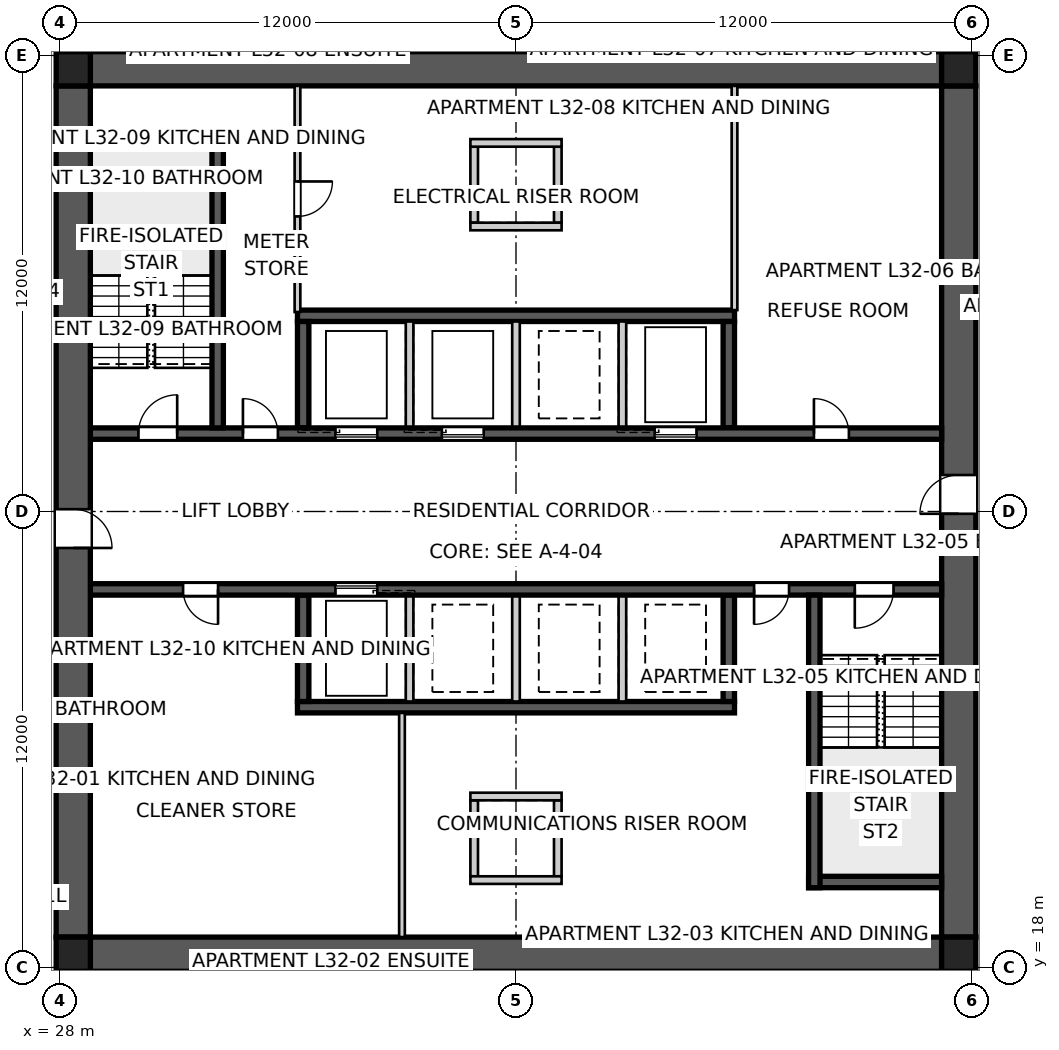
"""IFC4 building model, lengths in metres.
Left out: names, types, materials, properties, quantities, classifications, styles, units other than length and angle.
Written with IfcOpenShell. Run it as: python <this file> out.ifc"""

import sys

from ifc_helpers import new_model, si_unit, direction, frame, frame_2d, origin, origin_2d, place, context, subcontext, project, spatial, polyline, rectangle, outline, extrude, element, fill, save


model = new_model("IFC4")
c1 = context("Model", 3, precision=1e-05, world=origin(), true_north=direction((0.0, 1.0)))
c2 = subcontext(c1, "Body", "Model", "MODEL_VIEW")
j1 = project(units=[si_unit("LENGTHUNIT", "METRE"), si_unit("PLANEANGLEUNIT", "RADIAN")], contexts=[c1])
p1 = place(None, origin())
s1 = spatial("IfcSite", under=j1, at=p1, CompositionType="ELEMENT")
p2 = place(p1, origin())
s2 = spatial("IfcBuilding", under=s1, at=p2, CompositionType="ELEMENT")
p3 = place(p2, frame((0.0, 0.0, 118.4)))
s3 = spatial("IfcBuildingStorey", under=s2, at=p3, CompositionType="ELEMENT", Elevation=118.4)
for number, where, z_axis, x_axis in (
    (1, (28.8, 41.65, 0.0), (0.0, 0.0, 1.0), (1.0, 0.0, 0.0)),
    (2, (51.2, 18.35, 0.0), (0.0, 0.0, 1.0), (-1.0, 0.0, 0.0)),
):
    element("IfcWall", number, at=place(p3, frame(where, z_axis=z_axis, x_axis=x_axis)), inside=s3, PredefinedType="SHEAR", context=c2, shape_type="SweptSolid", body=[
        extrude(outline(polyline([(0.0, -0.45), (22.4, -0.45), (22.4, -0.025), (22.85, -0.025), (22.85, 0.025), (22.4, 0.025), (22.4, 0.45), (0.0, 0.45), (0.0, 0.025), (-0.45, 0.025), (-0.45, -0.025), (0.0, -0.025), (0.0, -0.45)])), origin(), (0.0, 0.0, 1.0), 3.4),
    ])
p4 = place(p3, frame((51.65, 18.8, 0.0), z_axis=(0.0, 0.0, 1.0), x_axis=(0.0, 1.0, 0.0)))
e3 = element("IfcWall", 3, at=p4, inside=s3, PredefinedType="SHEAR", context=c2, shape_type="SweptSolid", body=[
    extrude(outline(polyline([(0.0, -0.45), (22.4, -0.45), (22.4, -0.025), (22.85, -0.025), (22.85, 0.025), (22.4, 0.025), (22.4, 0.45), (0.0, 0.45), (0.0, 0.025), (-0.45, 0.025), (-0.45, -0.025), (0.0, -0.025), (0.0, -0.45)])), origin(), (0.0, 0.0, 1.0), 3.4),
])
p5 = place(p4, frame((11.14, 0.0, 0.0)))
e4 = element("IfcOpeningElement", 4, at=p5, cuts=e3, PredefinedType="OPENING", context=c2, shape_type="SweptSolid", body=[
    extrude(rectangle(XDim=1.02, YDim=2.4, at=frame_2d((0.51, 1.2))), frame((0.0, 0.46, 0.0), z_axis=(0.0, -1.0, 0.0), x_axis=(1.0, 0.0, 0.0)), (0.0, 0.0, 1.0), 0.92),
])
p6 = place(p3, frame((28.35, 41.2, 0.0), z_axis=(0.0, 0.0, 1.0), x_axis=(0.0, -1.0, 0.0)))
e5 = element("IfcWall", 5, at=p6, inside=s3, PredefinedType="SHEAR", context=c2, shape_type="SweptSolid", body=[
    extrude(outline(polyline([(0.0, -0.45), (22.4, -0.45), (22.4, -0.025), (22.85, -0.025), (22.85, 0.025), (22.4, 0.025), (22.4, 0.45), (0.0, 0.45), (0.0, 0.025), (-0.45, 0.025), (-0.45, -0.025), (0.0, -0.025), (0.0, -0.45)])), origin(), (0.0, 0.0, 1.0), 3.4),
])
p7 = place(p6, frame((11.14, 0.0, 0.0)))
e6 = element("IfcOpeningElement", 6, at=p7, cuts=e5, PredefinedType="OPENING", context=c2, shape_type="SweptSolid", body=[
    extrude(rectangle(XDim=1.02, YDim=2.4, at=frame_2d((0.51, 1.2))), frame((0.0, 0.46, 0.0), z_axis=(0.0, -1.0, 0.0), x_axis=(1.0, 0.0, 0.0)), (0.0, 0.0, 1.0), 0.92),
])
p8 = place(p3, frame((28.8, 32.05, 0.0), z_axis=(0.0, 0.0, 1.0), x_axis=(1.0, 0.0, 0.0)))
e7 = element("IfcWall", 7, at=p8, inside=s3, PredefinedType="SHEAR", context=c2, shape_type="SweptSolid", body=[
    extrude(rectangle(XDim=22.4, YDim=0.3, at=frame_2d((11.2, 0.0))), origin(), (0.0, 0.0, 1.0), 3.4),
])
p9 = place(p8, frame((19.04, 0.0, 0.0)))
e8 = element("IfcOpeningElement", 8, at=p9, cuts=e7, PredefinedType="OPENING", context=c2, shape_type="SweptSolid", body=[
    extrude(rectangle(XDim=0.92, YDim=2.1, at=frame_2d((0.46, 1.05))), frame((0.0, 0.16, 0.0), z_axis=(0.0, -1.0, 0.0), x_axis=(1.0, 0.0, 0.0)), (0.0, 0.0, 1.0), 0.32),
])
p10 = place(p8, frame((1.265, 0.0, 0.0)))
e9 = element("IfcOpeningElement", 9, at=p10, cuts=e7, PredefinedType="OPENING", context=c2, shape_type="SweptSolid", body=[
    extrude(rectangle(XDim=1.02, YDim=2.1, at=frame_2d((0.51, 1.05))), frame((0.0, 0.16, 0.0), z_axis=(0.0, -1.0, 0.0), x_axis=(1.0, 0.0, 0.0)), (0.0, 0.0, 1.0), 0.32),
])
p11 = place(p8, frame((4.015, 0.0, 0.0)))
e10 = element("IfcOpeningElement", 10, at=p11, cuts=e7, PredefinedType="OPENING", context=c2, shape_type="SweptSolid", body=[
    extrude(rectangle(XDim=0.92, YDim=2.1, at=frame_2d((0.46, 1.05))), frame((0.0, 0.16, 0.0), z_axis=(0.0, -1.0, 0.0), x_axis=(1.0, 0.0, 0.0)), (0.0, 0.0, 1.0), 0.32),
])
p12 = place(p8, frame((6.45, 0.0, 0.0)))
e11 = element("IfcOpeningElement", 11, at=p12, cuts=e7, PredefinedType="OPENING", context=c2, shape_type="SweptSolid", body=[
    extrude(rectangle(XDim=1.1, YDim=2.1, at=frame_2d((0.55, 1.05))), frame((0.0, 0.16, 0.0), z_axis=(0.0, -1.0, 0.0), x_axis=(1.0, 0.0, 0.0)), (0.0, 0.0, 1.0), 0.32),
])
p13 = place(p8, frame((9.25, 0.0, 0.0)))
e12 = element("IfcOpeningElement", 12, at=p13, cuts=e7, PredefinedType="OPENING", context=c2, shape_type="SweptSolid", body=[
    extrude(rectangle(XDim=1.1, YDim=2.1, at=frame_2d((0.55, 1.05))), frame((0.0, 0.16, 0.0), z_axis=(0.0, -1.0, 0.0), x_axis=(1.0, 0.0, 0.0)), (0.0, 0.0, 1.0), 0.32),
])
p14 = place(p8, frame((14.85, 0.0, 0.0)))
e13 = element("IfcOpeningElement", 13, at=p14, cuts=e7, PredefinedType="OPENING", context=c2, shape_type="SweptSolid", body=[
    extrude(rectangle(XDim=1.1, YDim=2.1, at=frame_2d((0.55, 1.05))), frame((0.0, 0.16, 0.0), z_axis=(0.0, -1.0, 0.0), x_axis=(1.0, 0.0, 0.0)), (0.0, 0.0, 1.0), 0.32),
])
p15 = place(p3, frame((51.2, 27.95, 0.0), z_axis=(0.0, 0.0, 1.0), x_axis=(-1.0, 0.0, 0.0)))
e14 = element("IfcWall", 14, at=p15, inside=s3, PredefinedType="SHEAR", context=c2, shape_type="SweptSolid", body=[
    extrude(rectangle(XDim=22.4, YDim=0.3, at=frame_2d((11.2, 0.0))), origin(), (0.0, 0.0, 1.0), 3.4),
])
p16 = place(p15, frame((19.04, 0.0, 0.0)))
e15 = element("IfcOpeningElement", 15, at=p16, cuts=e14, PredefinedType="OPENING", context=c2, shape_type="SweptSolid", body=[
    extrude(rectangle(XDim=0.92, YDim=2.1, at=frame_2d((0.46, 1.05))), frame((0.0, 0.16, 0.0), z_axis=(0.0, -1.0, 0.0), x_axis=(1.0, 0.0, 0.0)), (0.0, 0.0, 1.0), 0.32),
])
p17 = place(p15, frame((1.265, 0.0, 0.0)))
e16 = element("IfcOpeningElement", 16, at=p17, cuts=e14, PredefinedType="OPENING", context=c2, shape_type="SweptSolid", body=[
    extrude(rectangle(XDim=1.02, YDim=2.1, at=frame_2d((0.51, 1.05))), frame((0.0, 0.16, 0.0), z_axis=(0.0, -1.0, 0.0), x_axis=(1.0, 0.0, 0.0)), (0.0, 0.0, 1.0), 0.32),
])
p18 = place(p15, frame((4.015, 0.0, 0.0)))
e17 = element("IfcOpeningElement", 17, at=p18, cuts=e14, PredefinedType="OPENING", context=c2, shape_type="SweptSolid", body=[
    extrude(rectangle(XDim=0.92, YDim=2.1, at=frame_2d((0.46, 1.05))), frame((0.0, 0.16, 0.0), z_axis=(0.0, -1.0, 0.0), x_axis=(1.0, 0.0, 0.0)), (0.0, 0.0, 1.0), 0.32),
])
p19 = place(p15, frame((14.85, 0.0, 0.0)))
e18 = element("IfcOpeningElement", 18, at=p19, cuts=e14, PredefinedType="OPENING", context=c2, shape_type="SweptSolid", body=[
    extrude(rectangle(XDim=1.1, YDim=2.1, at=frame_2d((0.55, 1.05))), frame((0.0, 0.16, 0.0), z_axis=(0.0, -1.0, 0.0), x_axis=(1.0, 0.0, 0.0)), (0.0, 0.0, 1.0), 0.32),
])
for number, where, z_axis, x_axis in (
    (19, (34.25, 35.15, 0.0), (0.0, 0.0, 1.0), (1.0, 0.0, 0.0)),
    (20, (45.75, 24.85, 0.0), (0.0, 0.0, 1.0), (-1.0, 0.0, 0.0)),
):
    element("IfcWall", number, at=place(p3, frame(where, z_axis=z_axis, x_axis=x_axis)), inside=s3, PredefinedType="SHEAR", context=c2, shape_type="SweptSolid", body=[
        extrude(rectangle(XDim=11.5, YDim=0.3, at=frame_2d((5.75, 0.0))), origin(), (0.0, 0.0, 1.0), 3.4),
    ])
for number, where, z_axis, x_axis in (
    (21, (34.4, 32.2, 0.0), (0.0, 0.0, 1.0), (0.0, 1.0, 0.0)),
    (22, (45.6, 27.8, 0.0), (0.0, 0.0, 1.0), (0.0, -1.0, 0.0)),
):
    element("IfcWall", number, at=place(p3, frame(where, z_axis=z_axis, x_axis=x_axis)), inside=s3, PredefinedType="SHEAR", context=c2, shape_type="SweptSolid", body=[
        extrude(rectangle(XDim=2.8, YDim=0.3, at=frame_2d((1.4, 0.0))), origin(), (0.0, 0.0, 1.0), 3.4),
    ])
for number, where, z_axis, x_axis in (
    (23, (37.2, 32.2, 0.0), (0.0, 0.0, 1.0), (0.0, 1.0, 0.0)),
    (24, (42.8, 27.8, 0.0), (0.0, 0.0, 1.0), (0.0, -1.0, 0.0)),
    (25, (40.0, 32.2, 0.0), (0.0, 0.0, 1.0), (0.0, 1.0, 0.0)),
    (26, (40.0, 27.8, 0.0), (0.0, 0.0, 1.0), (0.0, -1.0, 0.0)),
    (27, (42.8, 32.2, 0.0), (0.0, 0.0, 1.0), (0.0, 1.0, 0.0)),
    (28, (37.2, 27.8, 0.0), (0.0, 0.0, 1.0), (0.0, -1.0, 0.0)),
):
    element("IfcWall", number, at=place(p3, frame(where, z_axis=z_axis, x_axis=x_axis)), inside=s3, PredefinedType="SOLIDWALL", context=c2, shape_type="SweptSolid", body=[
        extrude(rectangle(XDim=2.8, YDim=0.2, at=frame_2d((1.4, 0.0))), origin(), (0.0, 0.0, 1.0), 3.4),
    ])
for number, where, z_axis, x_axis in (
    (29, (45.6, 32.2, 0.0), (0.0, 0.0, 1.0), (0.0, 1.0, 0.0)),
    (30, (34.4, 27.8, 0.0), (0.0, 0.0, 1.0), (0.0, -1.0, 0.0)),
):
    element("IfcWall", number, at=place(p3, frame(where, z_axis=z_axis, x_axis=x_axis)), inside=s3, PredefinedType="SHEAR", context=c2, shape_type="SweptSolid", body=[
        extrude(rectangle(XDim=2.8, YDim=0.3, at=frame_2d((1.4, 0.0))), origin(), (0.0, 0.0, 1.0), 3.4),
    ])
p20 = place(p3, frame((32.15, 32.2, 0.0), z_axis=(0.0, 0.0, 1.0), x_axis=(0.0, 1.0, 0.0)))
e31 = element("IfcWall", 31, at=p20, inside=s3, PredefinedType="SHEAR", context=c2, shape_type="SweptSolid", body=[
    extrude(rectangle(XDim=7.7, YDim=0.3, at=frame_2d((3.85, 0.0))), origin(), (0.0, 0.0, 1.0), 3.4),
])
p21 = place(p3, frame((28.8, 39.75, 0.0), z_axis=(0.0, 0.0, 1.0), x_axis=(1.0, 0.0, 0.0)))
e32 = element("IfcWall", 32, at=p21, inside=s3, PredefinedType="SHEAR", context=c2, shape_type="SweptSolid", body=[
    extrude(rectangle(XDim=3.5, YDim=0.3, at=frame_2d((1.75, 0.0))), origin(), (0.0, 0.0, 1.0), 3.4),
])
p22 = place(p3, frame((47.85, 27.8, 0.0), z_axis=(0.0, 0.0, 1.0), x_axis=(0.0, -1.0, 0.0)))
e33 = element("IfcWall", 33, at=p22, inside=s3, PredefinedType="SHEAR", context=c2, shape_type="SweptSolid", body=[
    extrude(rectangle(XDim=7.7, YDim=0.3, at=frame_2d((3.85, 0.0))), origin(), (0.0, 0.0, 1.0), 3.4),
])
p23 = place(p3, frame((51.2, 20.25, 0.0), z_axis=(0.0, 0.0, 1.0), x_axis=(-1.0, 0.0, 0.0)))
e34 = element("IfcWall", 34, at=p23, inside=s3, PredefinedType="SHEAR", context=c2, shape_type="SweptSolid", body=[
    extrude(rectangle(XDim=3.5, YDim=0.3, at=frame_2d((1.75, 0.0))), origin(), (0.0, 0.0, 1.0), 3.4),
])
for number, where, z_axis, x_axis in (
    (35, (38.9, 37.6, 0.0), (0.0, 0.0, 1.0), (0.0, 1.0, 0.0)),
    (36, (41.1, 37.6, 0.0), (0.0, 0.0, 1.0), (0.0, 1.0, 0.0)),
):
    element("IfcWall", number, at=place(p3, frame(where, z_axis=z_axis, x_axis=x_axis)), inside=s3, PredefinedType="SOLIDWALL", context=c2, shape_type="SweptSolid", body=[
        extrude(rectangle(XDim=2.0, YDim=0.2, at=frame_2d((1.0, 0.0))), origin(), (0.0, 0.0, 1.0), 3.4),
    ])
for number, where, z_axis, x_axis in (
    (37, (38.8, 37.5, 0.0), (0.0, 0.0, 1.0), (1.0, 0.0, 0.0)),
    (38, (38.8, 39.7, 0.0), (0.0, 0.0, 1.0), (1.0, 0.0, 0.0)),
):
    element("IfcWall", number, at=place(p3, frame(where, z_axis=z_axis, x_axis=x_axis)), inside=s3, PredefinedType="SOLIDWALL", context=c2, shape_type="SweptSolid", body=[
        extrude(rectangle(XDim=2.4, YDim=0.2, at=frame_2d((1.2, 0.0))), origin(), (0.0, 0.0, 1.0), 3.4),
    ])
for number, where, z_axis, x_axis in (
    (39, (38.9, 22.4, 0.0), (0.0, 0.0, 1.0), (0.0, -1.0, 0.0)),
    (40, (41.1, 22.4, 0.0), (0.0, 0.0, 1.0), (0.0, -1.0, 0.0)),
):
    element("IfcWall", number, at=place(p3, frame(where, z_axis=z_axis, x_axis=x_axis)), inside=s3, PredefinedType="SOLIDWALL", context=c2, shape_type="SweptSolid", body=[
        extrude(rectangle(XDim=2.0, YDim=0.2, at=frame_2d((1.0, 0.0))), origin(), (0.0, 0.0, 1.0), 3.4),
    ])
for number, where, z_axis, x_axis in (
    (41, (38.8, 22.5, 0.0), (0.0, 0.0, 1.0), (1.0, 0.0, 0.0)),
    (42, (38.8, 20.3, 0.0), (0.0, 0.0, 1.0), (1.0, 0.0, 0.0)),
):
    element("IfcWall", number, at=place(p3, frame(where, z_axis=z_axis, x_axis=x_axis)), inside=s3, PredefinedType="SOLIDWALL", context=c2, shape_type="SweptSolid", body=[
        extrude(rectangle(XDim=2.4, YDim=0.2, at=frame_2d((1.2, 0.0))), origin(), (0.0, 0.0, 1.0), 3.4),
    ])
for number, where, z_axis, x_axis in (
    (43, (28.35, 18.35, 0.0), (0.0, 0.0, 1.0), (1.0, 0.0, 0.0)),
    (44, (51.65, 18.35, 0.0), (0.0, 0.0, 1.0), (1.0, 0.0, 0.0)),
    (45, (51.65, 41.65, 0.0), (0.0, 0.0, 1.0), (1.0, 0.0, 0.0)),
    (46, (28.35, 41.65, 0.0), (0.0, 0.0, 1.0), (1.0, 0.0, 0.0)),
):
    element("IfcColumn", number, at=place(p3, frame(where, z_axis=z_axis, x_axis=x_axis)), inside=s3, PredefinedType="COLUMN", context=c2, shape_type="SweptSolid", body=[
        extrude(rectangle(XDim=0.9, YDim=0.9, at=origin_2d()), origin(), (0.0, 0.0, 1.0), 3.4),
    ])
p24 = place(p3, frame((34.25, 41.2, 0.0), z_axis=(0.0, 0.0, 1.0), x_axis=(0.0, -1.0, 0.0)))
e47 = element("IfcWall", 47, at=p24, inside=s3, PredefinedType="SOLIDWALL", context=c2, shape_type="SweptSolid", body=[
    extrude(rectangle(XDim=5.95, YDim=0.15, at=frame_2d((2.975, 0.0))), origin(), (0.0, 0.0, 1.0), 3.25),
])
p25 = place(p24, frame((2.515, 0.0, 0.0)))
e48 = element("IfcOpeningElement", 48, at=p25, cuts=e47, PredefinedType="OPENING", context=c2, shape_type="SweptSolid", body=[
    extrude(rectangle(XDim=0.92, YDim=2.1, at=frame_2d((0.46, 1.05))), frame((0.0, 0.085, 0.0), z_axis=(0.0, -1.0, 0.0), x_axis=(1.0, 0.0, 0.0)), (0.0, 0.0, 1.0), 0.17),
])
for number, where, z_axis, x_axis in (
    (49, (45.75, 41.2, 0.0), (0.0, 0.0, 1.0), (0.0, -1.0, 0.0)),
    (50, (37.0, 18.8, 0.0), (0.0, 0.0, 1.0), (0.0, 1.0, 0.0)),
):
    element("IfcWall", number, at=place(p3, frame(where, z_axis=z_axis, x_axis=x_axis)), inside=s3, PredefinedType="SOLIDWALL", context=c2, shape_type="SweptSolid", body=[
        extrude(rectangle(XDim=5.9, YDim=0.15, at=frame_2d((2.95, 0.0))), origin(), (0.0, 0.0, 1.0), 3.25),
    ])
p26 = place(p9, origin())
e51 = element("IfcDoor", 51, at=p26, inside=s3, OperationType="SINGLE_SWING_LEFT", PredefinedType="DOOR", context=c2, shape_type="SweptSolid", body=[
    extrude(rectangle(XDim=0.92, YDim=2.1, at=frame_2d((0.46, 1.05))), frame((0.0, 0.025, 0.0), z_axis=(0.0, -1.0, 0.0), x_axis=(1.0, 0.0, 0.0)), (0.0, 0.0, 1.0), 0.05),
])
fill(e8, e51)
p27 = place(p16, origin())
e52 = element("IfcDoor", 52, at=p27, inside=s3, OperationType="SINGLE_SWING_LEFT", PredefinedType="DOOR", context=c2, shape_type="SweptSolid", body=[
    extrude(rectangle(XDim=0.92, YDim=2.1, at=frame_2d((0.46, 1.05))), frame((0.0, 0.025, 0.0), z_axis=(0.0, -1.0, 0.0), x_axis=(1.0, 0.0, 0.0)), (0.0, 0.0, 1.0), 0.05),
])
fill(e15, e52)
p28 = place(p17, origin())
e53 = element("IfcDoor", 53, at=p28, inside=s3, OperationType="SINGLE_SWING_RIGHT", PredefinedType="DOOR", context=c2, shape_type="SweptSolid", body=[
    extrude(rectangle(XDim=1.02, YDim=2.1, at=frame_2d((0.51, 1.05))), frame((0.0, 0.025, 0.0), z_axis=(0.0, -1.0, 0.0), x_axis=(1.0, 0.0, 0.0)), (0.0, 0.0, 1.0), 0.05),
])
fill(e16, e53)
p29 = place(p10, origin())
e54 = element("IfcDoor", 54, at=p29, inside=s3, OperationType="SINGLE_SWING_RIGHT", PredefinedType="DOOR", context=c2, shape_type="SweptSolid", body=[
    extrude(rectangle(XDim=1.02, YDim=2.1, at=frame_2d((0.51, 1.05))), frame((0.0, 0.025, 0.0), z_axis=(0.0, -1.0, 0.0), x_axis=(1.0, 0.0, 0.0)), (0.0, 0.0, 1.0), 0.05),
])
fill(e9, e54)
p30 = place(p11, origin())
e55 = element("IfcDoor", 55, at=p30, inside=s3, OperationType="SINGLE_SWING_LEFT", PredefinedType="DOOR", context=c2, shape_type="SweptSolid", body=[
    extrude(rectangle(XDim=0.92, YDim=2.1, at=frame_2d((0.46, 1.05))), frame((0.0, 0.025, 0.0), z_axis=(0.0, -1.0, 0.0), x_axis=(1.0, 0.0, 0.0)), (0.0, 0.0, 1.0), 0.05),
])
fill(e10, e55)
p31 = place(p18, origin())
e56 = element("IfcDoor", 56, at=p31, inside=s3, OperationType="SINGLE_SWING_RIGHT", PredefinedType="DOOR", context=c2, shape_type="SweptSolid", body=[
    extrude(rectangle(XDim=0.92, YDim=2.1, at=frame_2d((0.46, 1.05))), frame((0.0, 0.025, 0.0), z_axis=(0.0, -1.0, 0.0), x_axis=(1.0, 0.0, 0.0)), (0.0, 0.0, 1.0), 0.05),
])
fill(e17, e56)
p32 = place(p25, origin())
e57 = element("IfcDoor", 57, at=p32, inside=s3, OperationType="SINGLE_SWING_LEFT", PredefinedType="DOOR", context=c2, shape_type="SweptSolid", body=[
    extrude(rectangle(XDim=0.92, YDim=2.1, at=frame_2d((0.46, 1.05))), frame((0.0, 0.025, 0.0), z_axis=(0.0, -1.0, 0.0), x_axis=(1.0, 0.0, 0.0)), (0.0, 0.0, 1.0), 0.05),
])
fill(e48, e57)
p33 = place(p5, origin())
e58 = element("IfcDoor", 58, at=p33, inside=s3, OperationType="SINGLE_SWING_LEFT", PredefinedType="DOOR", context=c2, shape_type="SweptSolid", body=[
    extrude(rectangle(XDim=1.02, YDim=2.4, at=frame_2d((0.51, 1.2))), frame((0.0, 0.025, 0.0), z_axis=(0.0, -1.0, 0.0), x_axis=(1.0, 0.0, 0.0)), (0.0, 0.0, 1.0), 0.05),
])
fill(e4, e58)
p34 = place(p7, origin())
e59 = element("IfcDoor", 59, at=p34, inside=s3, OperationType="SINGLE_SWING_RIGHT", PredefinedType="DOOR", context=c2, shape_type="SweptSolid", body=[
    extrude(rectangle(XDim=1.02, YDim=2.4, at=frame_2d((0.51, 1.2))), frame((0.0, 0.025, 0.0), z_axis=(0.0, -1.0, 0.0), x_axis=(1.0, 0.0, 0.0)), (0.0, 0.0, 1.0), 0.05),
])
fill(e6, e59)
p35 = place(p12, origin())
e60 = element("IfcDoor", 60, at=p35, inside=s3, OperationType="SLIDING_TO_LEFT", PredefinedType="DOOR", context=c2, shape_type="SweptSolid", body=[
    extrude(rectangle(XDim=1.1, YDim=2.1, at=frame_2d((0.55, 1.05))), frame((0.0, 0.025, 0.0), z_axis=(0.0, -1.0, 0.0), x_axis=(1.0, 0.0, 0.0)), (0.0, 0.0, 1.0), 0.05),
])
fill(e11, e60)
p36 = place(p13, origin())
e61 = element("IfcDoor", 61, at=p36, inside=s3, OperationType="SLIDING_TO_LEFT", PredefinedType="DOOR", context=c2, shape_type="SweptSolid", body=[
    extrude(rectangle(XDim=1.1, YDim=2.1, at=frame_2d((0.55, 1.05))), frame((0.0, 0.025, 0.0), z_axis=(0.0, -1.0, 0.0), x_axis=(1.0, 0.0, 0.0)), (0.0, 0.0, 1.0), 0.05),
])
fill(e12, e61)
p37 = place(p14, origin())
e62 = element("IfcDoor", 62, at=p37, inside=s3, OperationType="SLIDING_TO_LEFT", PredefinedType="DOOR", context=c2, shape_type="SweptSolid", body=[
    extrude(rectangle(XDim=1.1, YDim=2.1, at=frame_2d((0.55, 1.05))), frame((0.0, 0.025, 0.0), z_axis=(0.0, -1.0, 0.0), x_axis=(1.0, 0.0, 0.0)), (0.0, 0.0, 1.0), 0.05),
])
fill(e13, e62)
p38 = place(p19, origin())
e63 = element("IfcDoor", 63, at=p38, inside=s3, OperationType="SLIDING_TO_LEFT", PredefinedType="DOOR", context=c2, shape_type="SweptSolid", body=[
    extrude(rectangle(XDim=1.1, YDim=2.1, at=frame_2d((0.55, 1.05))), frame((0.0, 0.025, 0.0), z_axis=(0.0, -1.0, 0.0), x_axis=(1.0, 0.0, 0.0)), (0.0, 0.0, 1.0), 0.05),
])
fill(e18, e63)
save(model, sys.argv[1])
